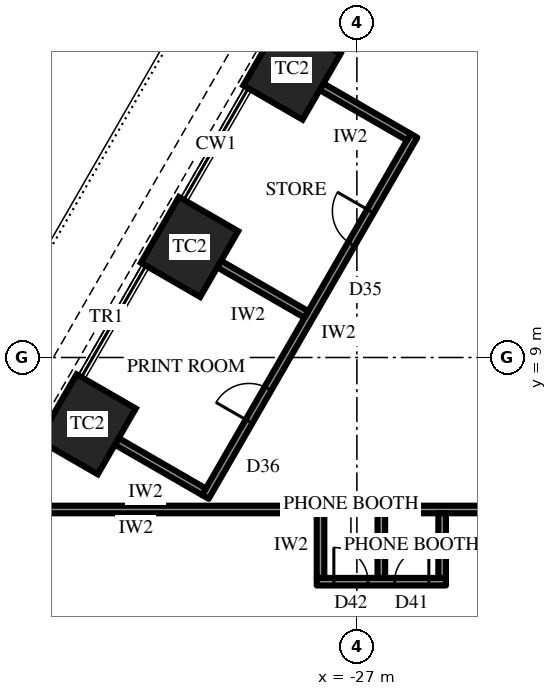
"""IFC4 building model, lengths in metres.
Left out: names, types, materials, properties, quantities, classifications, styles, units other than length and angle.
Written with IfcOpenShell. Run it as: python <this file> out.ifc"""

import sys

from ifc_helpers import new_model, si_unit, direction, frame, frame_2d, origin, origin_2d, place, context, subcontext, project, spatial, rectangle, extrude, element, fill, save


model = new_model("IFC4")
c1 = context("Model", 3, precision=1e-05, world=origin(), true_north=direction((0.0, 1.0)))
c2 = subcontext(c1, "Body", "Model", "MODEL_VIEW")
j1 = project(units=[si_unit("LENGTHUNIT", "METRE"), si_unit("PLANEANGLEUNIT", "RADIAN")], contexts=[c1])
p1 = place(None, origin())
s1 = spatial("IfcSite", under=j1, at=p1, CompositionType="ELEMENT")
p2 = place(p1, origin())
s2 = spatial("IfcBuilding", under=s1, at=p2, CompositionType="ELEMENT")
p3 = place(p2, frame((0.0, 0.0, 48.7)))
s3 = spatial("IfcBuildingStorey", under=s2, at=p3, CompositionType="ELEMENT", Elevation=48.7)
for number, where, z_axis, x_axis in (
    (1, (-28.709, 16.575, 0.0), (0.0, 0.0, 1.0), (-0.5, -0.866, 0.0)),
    (2, (-31.403, 11.908, 0.0), (0.0, 0.0, 1.0), (-0.5, -0.866, 0.0)),
    (3, (-34.097, 7.242, 0.0), (0.0, 0.0, 1.0), (-0.5, -0.866, 0.0)),
):
    element("IfcColumn", number, at=place(p3, frame(where, z_axis=z_axis, x_axis=x_axis)), inside=s3, PredefinedType="COLUMN", context=c2, shape_type="SweptSolid", body=[
        extrude(rectangle(XDim=2.0, YDim=1.8, at=origin_2d()), origin(), (0.0, 0.0, 1.0), 4.2),
    ])
p4 = place(p3, frame((-25.498, 14.837, 0.0), z_axis=(0.0, 0.0, 1.0), x_axis=(-0.499992624997, -0.866029661703, 0.0)))
e4 = element("IfcWall", 4, at=p4, inside=s3, PredefinedType="PARTITIONING", context=c2, shape_type="SweptSolid", body=[
    extrude(rectangle(XDim=10.977, YDim=0.2, at=frame_2d((5.489, 0.0))), origin(), (0.0, 0.0, 1.0), 4.0),
])
p5 = place(p4, frame((2.294, 0.0, 0.0)))
e5 = element("IfcOpeningElement", 5, at=p5, cuts=e4, PredefinedType="OPENING", context=c2, shape_type="SweptSolid", body=[
    extrude(rectangle(XDim=1.0, YDim=2.2, at=frame_2d((0.5, 1.1))), frame((0.0, 0.11, 0.0), z_axis=(0.0, -1.0, 0.0), x_axis=(1.0, 0.0, 0.0)), (0.0, 0.0, 1.0), 0.22),
])
p6 = place(p4, frame((7.683, 0.0, 0.0)))
e6 = element("IfcOpeningElement", 6, at=p6, cuts=e4, PredefinedType="OPENING", context=c2, shape_type="SweptSolid", body=[
    extrude(rectangle(XDim=1.0, YDim=2.2, at=frame_2d((0.5, 1.1))), frame((0.0, 0.11, 0.0), z_axis=(0.0, -1.0, 0.0), x_axis=(1.0, 0.0, 0.0)), (0.0, 0.0, 1.0), 0.22),
])
p7 = place(p3, frame((-25.634, 14.8, 0.0), z_axis=(0.0, 0.0, 1.0), x_axis=(-0.866029095148, 0.499993606316, 0.0)))
e7 = element("IfcWall", 7, at=p7, inside=s3, PredefinedType="PARTITIONING", context=c2, shape_type="SweptSolid", body=[
    extrude(rectangle(XDim=2.65, YDim=0.2, at=frame_2d((1.325, 0.0))), origin(), (0.0, 0.0, 1.0), 4.0),
])
p8 = place(p3, frame((-28.329, 10.133, 0.0), z_axis=(0.0, 0.0, 1.0), x_axis=(-0.866029095148, 0.499993606316, 0.0)))
e8 = element("IfcWall", 8, at=p8, inside=s3, PredefinedType="PARTITIONING", context=c2, shape_type="SweptSolid", body=[
    extrude(rectangle(XDim=2.65, YDim=0.2, at=frame_2d((1.325, 0.0))), origin(), (0.0, 0.0, 1.0), 2.944),
])
p9 = place(p3, frame((-31.023, 5.467, 0.0), z_axis=(0.0, 0.0, 1.0), x_axis=(-0.865989200783, 0.500062700197, 0.0)))
e9 = element("IfcWall", 9, at=p9, inside=s3, PredefinedType="PARTITIONING", context=c2, shape_type="SweptSolid", body=[
    extrude(rectangle(XDim=2.65, YDim=0.2, at=frame_2d((1.325, 0.0))), origin(), (0.0, 0.0, 1.0), 2.944),
])
p10 = place(p3, frame((-21.1, 5.0, 0.0), z_axis=(0.0, 0.0, 1.0), x_axis=(-1.0, 0.0, 0.0)))
e10 = element("IfcWall", 10, at=p10, inside=s3, PredefinedType="PARTITIONING", context=c2, shape_type="SweptSolid", body=[
    extrude(rectangle(XDim=15.019, YDim=0.2, at=frame_2d((7.509, 0.0))), origin(), (0.0, 0.0, 1.0), 4.0),
])
p11 = place(p10, frame((1.002, 0.0, 0.0)))
e11 = element("IfcOpeningElement", 11, at=p11, cuts=e10, PredefinedType="OPENING", context=c2, shape_type="SweptSolid", body=[
    extrude(rectangle(XDim=1.0, YDim=2.2, at=frame_2d((0.5, 1.1))), frame((0.0, 0.11, 0.0), z_axis=(0.0, -1.0, 0.0), x_axis=(1.0, 0.0, 0.0)), (0.0, 0.0, 1.0), 0.22),
])
p12 = place(p3, frame((-24.657, 3.1, 0.0), z_axis=(0.0, 0.0, 1.0), x_axis=(-1.0, 0.0, 0.0)))
e12 = element("IfcWall", 12, at=p12, inside=s3, PredefinedType="PARTITIONING", context=c2, shape_type="SweptSolid", body=[
    extrude(rectangle(XDim=3.4, YDim=0.2, at=frame_2d((1.7, 0.0))), origin(), (0.0, 0.0, 1.0), 4.0),
])
p13 = place(p12, frame((0.45, 0.0, 0.0)))
e13 = element("IfcOpeningElement", 13, at=p13, cuts=e12, PredefinedType="OPENING", context=c2, shape_type="SweptSolid", body=[
    extrude(rectangle(XDim=0.9, YDim=2.2, at=frame_2d((0.45, 1.1))), frame((0.0, 0.11, 0.0), z_axis=(0.0, -1.0, 0.0), x_axis=(1.0, 0.0, 0.0)), (0.0, 0.0, 1.0), 0.22),
])
p14 = place(p12, frame((2.05, 0.0, 0.0)))
e14 = element("IfcOpeningElement", 14, at=p14, cuts=e12, PredefinedType="OPENING", context=c2, shape_type="SweptSolid", body=[
    extrude(rectangle(XDim=0.9, YDim=2.2, at=frame_2d((0.45, 1.1))), frame((0.0, 0.11, 0.0), z_axis=(0.0, -1.0, 0.0), x_axis=(1.0, 0.0, 0.0)), (0.0, 0.0, 1.0), 0.22),
])
for number, where, z_axis, x_axis in (
    (15, (-24.757, 4.9, 0.0), (0.0, 0.0, 1.0), (0.0, -1.0, 0.0)),
    (16, (-26.357, 4.9, 0.0), (0.0, 0.0, 1.0), (0.0, -1.0, 0.0)),
    (17, (-27.957, 4.9, 0.0), (0.0, 0.0, 1.0), (0.0, -1.0, 0.0)),
):
    element("IfcWall", number, at=place(p3, frame(where, z_axis=z_axis, x_axis=x_axis)), inside=s3, PredefinedType="PARTITIONING", context=c2, shape_type="SweptSolid", body=[
        extrude(rectangle(XDim=1.7, YDim=0.2, at=frame_2d((0.85, 0.0))), origin(), (0.0, 0.0, 1.0), 4.0),
    ])
p15 = place(p5, frame((1.0, 0.0, 0.0), z_axis=(0.0, 0.0, 1.0), x_axis=(-1.0, 0.0, 0.0)))
e18 = element("IfcDoor", 18, at=p15, inside=s3, OperationType="SINGLE_SWING_LEFT", PredefinedType="DOOR", context=c2, shape_type="SweptSolid", body=[
    extrude(rectangle(XDim=1.0, YDim=2.2, at=frame_2d((0.5, 1.1))), frame((0.0, 0.025, 0.0), z_axis=(0.0, -1.0, 0.0), x_axis=(1.0, 0.0, 0.0)), (0.0, 0.0, 1.0), 0.05),
])
fill(e5, e18)
p16 = place(p6, frame((1.0, 0.0, 0.0), z_axis=(0.0, 0.0, 1.0), x_axis=(-1.0, 0.0, 0.0)))
e19 = element("IfcDoor", 19, at=p16, inside=s3, OperationType="SINGLE_SWING_RIGHT", PredefinedType="DOOR", context=c2, shape_type="SweptSolid", body=[
    extrude(rectangle(XDim=1.0, YDim=2.2, at=frame_2d((0.5, 1.1))), frame((0.0, 0.025, 0.0), z_axis=(0.0, -1.0, 0.0), x_axis=(1.0, 0.0, 0.0)), (0.0, 0.0, 1.0), 0.05),
])
fill(e6, e19)
p17 = place(p13, frame((0.9, 0.0, 0.0), z_axis=(0.0, 0.0, 1.0), x_axis=(-1.0, 0.0, 0.0)))
e20 = element("IfcDoor", 20, at=p17, inside=s3, OperationType="SINGLE_SWING_LEFT", PredefinedType="DOOR", context=c2, shape_type="SweptSolid", body=[
    extrude(rectangle(XDim=0.9, YDim=2.2, at=frame_2d((0.45, 1.1))), frame((0.0, 0.025, 0.0), z_axis=(0.0, -1.0, 0.0), x_axis=(1.0, 0.0, 0.0)), (0.0, 0.0, 1.0), 0.05),
])
fill(e13, e20)
p18 = place(p14, frame((0.9, 0.0, 0.0), z_axis=(0.0, 0.0, 1.0), x_axis=(-1.0, 0.0, 0.0)))
e21 = element("IfcDoor", 21, at=p18, inside=s3, OperationType="SINGLE_SWING_RIGHT", PredefinedType="DOOR", context=c2, shape_type="SweptSolid", body=[
    extrude(rectangle(XDim=0.9, YDim=2.2, at=frame_2d((0.45, 1.1))), frame((0.0, 0.025, 0.0), z_axis=(0.0, -1.0, 0.0), x_axis=(1.0, 0.0, 0.0)), (0.0, 0.0, 1.0), 0.05),
])
fill(e14, e21)
save(model, sys.argv[1])
